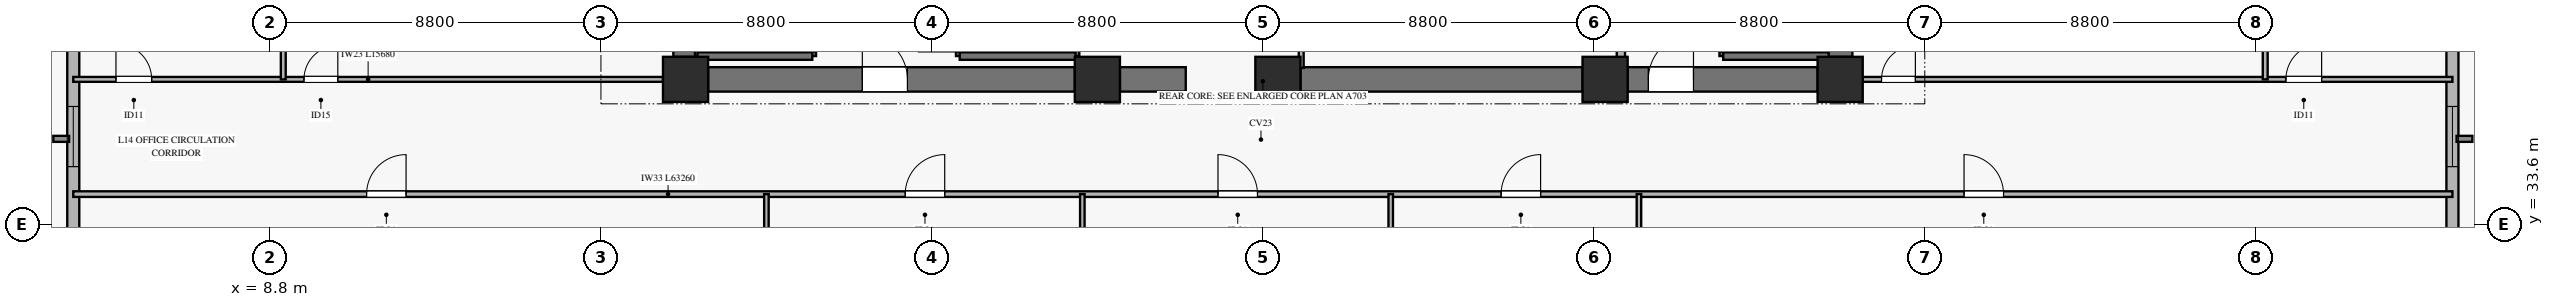
"""IFC4 building model, lengths in metres.
Left out: names, types, materials, properties, quantities, classifications, styles, units other than length and angle.
Written with IfcOpenShell. Run it as: python <this file> out.ifc"""

import sys

from ifc_helpers import new_model, si_unit, direction, frame, frame_2d, origin, origin_2d, place, context, subcontext, project, spatial, rectangle, extrude, source, transform, mapped, element, fill, save


model = new_model("IFC4")
c1 = context("Model", 3, precision=1e-05, world=origin(), true_north=direction((0.0, 1.0)))
c2 = subcontext(c1, "Body", "Model", "MODEL_VIEW")
j1 = project(units=[si_unit("LENGTHUNIT", "METRE"), si_unit("PLANEANGLEUNIT", "RADIAN")], contexts=[c1])
p1 = place(None, origin())
s1 = spatial("IfcSite", under=j1, at=p1, CompositionType="ELEMENT")
p2 = place(p1, origin())
s2 = spatial("IfcBuilding", under=s1, at=p2, CompositionType="ELEMENT")
p3 = place(p2, frame((0.0, 0.0, 57.2)))
s3 = spatial("IfcBuildingStorey", under=s2, at=p3, CompositionType="ELEMENT", Elevation=57.2)
m1 = source(origin(), c2, "Body", "SweptSolid", [
    extrude(rectangle(XDim=1.2, YDim=1.2, at=origin_2d()), origin(), (0.0, 0.0, 1.0), 3.68),
])
for number, where, z_axis, x_axis in (
    (1, (19.85, 37.45, 0.0), (0.0, 0.0, 1.0), (1.0, 0.0, 0.0)),
    (2, (30.8, 37.45, 0.0), (0.0, 0.0, 1.0), (1.0, 0.0, 0.0)),
    (3, (35.6, 37.45, 0.0), (0.0, 0.0, 1.0), (1.0, 0.0, 0.0)),
    (4, (44.3, 37.45, 0.0), (0.0, 0.0, 1.0), (1.0, 0.0, 0.0)),
    (5, (50.55, 37.45, 0.0), (0.0, 0.0, 1.0), (1.0, 0.0, 0.0)),
):
    element("IfcColumn", number, at=place(p3, frame(where, z_axis=z_axis, x_axis=x_axis)), inside=s3, PredefinedType="PILASTER", context=c2, shape_type="MappedRepresentation", body=[
        mapped(m1, transform((0.0, 0.0, 0.0), x_axis=(1.0, 0.0, 0.0), y_axis=(0.0, 1.0, 0.0), z_axis=(0.0, 0.0, 1.0), scale=1.0)),
    ])
p4 = place(p3, frame((20.45, 37.45, 0.0), z_axis=(0.0, 0.0, 1.0), x_axis=(1.0, 0.0, 0.0)))
e6 = element("IfcWall", 6, at=p4, inside=s3, PredefinedType="SHEAR", context=c2, shape_type="SweptSolid", body=[
    extrude(rectangle(XDim=9.75, YDim=0.65, at=frame_2d((4.875, 0.0))), origin(), (0.0, 0.0, 1.0), 3.68),
])
p5 = place(p4, frame((4.1, 0.0, 0.0)))
e7 = element("IfcOpeningElement", 7, at=p5, cuts=e6, PredefinedType="OPENING", context=c2, shape_type="SweptSolid", body=[
    extrude(rectangle(XDim=1.2, YDim=2.15, at=frame_2d((0.6, 1.075))), frame((0.0, 0.335, 0.0), z_axis=(0.0, -1.0, 0.0), x_axis=(1.0, 0.0, 0.0)), (0.0, 0.0, 1.0), 0.67),
])
p6 = place(p3, frame((31.4, 37.45, 0.0), z_axis=(0.0, 0.0, 1.0), x_axis=(1.0, 0.0, 0.0)))
e8 = element("IfcWall", 8, at=p6, inside=s3, PredefinedType="SHEAR", context=c2, shape_type="SweptSolid", body=[
    extrude(rectangle(XDim=1.75, YDim=0.65, at=frame_2d((0.875, 0.0))), origin(), (0.0, 0.0, 1.0), 3.68),
])
p7 = place(p3, frame((36.2, 37.45, 0.0), z_axis=(0.0, 0.0, 1.0), x_axis=(1.0, 0.0, 0.0)))
e9 = element("IfcWall", 9, at=p7, inside=s3, PredefinedType="SHEAR", context=c2, shape_type="SweptSolid", body=[
    extrude(rectangle(XDim=7.5, YDim=0.65, at=frame_2d((3.75, 0.0))), origin(), (0.0, 0.0, 1.0), 3.68),
])
p8 = place(p3, frame((44.9, 37.45, 0.0), z_axis=(0.0, 0.0, 1.0), x_axis=(1.0, 0.0, 0.0)))
e10 = element("IfcWall", 10, at=p8, inside=s3, PredefinedType="SHEAR", context=c2, shape_type="SweptSolid", body=[
    extrude(rectangle(XDim=5.05, YDim=0.65, at=frame_2d((2.525, 0.0))), origin(), (0.0, 0.0, 1.0), 3.68),
])
p9 = place(p8, frame((0.55, 0.0, 0.0)))
e11 = element("IfcOpeningElement", 11, at=p9, cuts=e10, PredefinedType="OPENING", context=c2, shape_type="SweptSolid", body=[
    extrude(rectangle(XDim=1.2, YDim=2.15, at=frame_2d((0.6, 1.075))), frame((0.0, 0.335, 0.0), z_axis=(0.0, -1.0, 0.0), x_axis=(1.0, 0.0, 0.0)), (0.0, 0.0, 1.0), 0.67),
])
for number, where, z_axis, x_axis in (
    (12, (19.85, 38.05, 0.0), (0.0, 0.0, 1.0), (0.0, 1.0, 0.0)),
    (13, (50.55, 38.05, 0.0), (0.0, 0.0, 1.0), (0.0, 1.0, 0.0)),
):
    element("IfcWall", number, at=place(p3, frame(where, z_axis=z_axis, x_axis=x_axis)), inside=s3, PredefinedType="SHEAR", context=c2, shape_type="SweptSolid", body=[
        extrude(rectangle(XDim=7.9, YDim=0.65, at=frame_2d((3.95, 0.0))), origin(), (0.0, 0.0, 1.0), 3.68),
    ])
p10 = place(p3, frame((3.57, 25.777, 0.0), z_axis=(0.0, 0.0, 1.0), x_axis=(0.0, 1.0, 0.0)))
e14 = element("IfcWall", 14, at=p10, inside=s3, PredefinedType="SOLIDWALL", context=c2, shape_type="SweptSolid", body=[
    extrude(rectangle(XDim=17.175, YDim=0.32, at=frame_2d((8.587, 0.0))), origin(), (0.0, 0.0, 1.0), 3.16),
])
p11 = place(p10, frame((9.353, 0.0, 0.45)))
e15 = element("IfcOpeningElement", 15, at=p11, cuts=e14, PredefinedType="OPENING", context=c2, shape_type="SweptSolid", body=[
    extrude(rectangle(XDim=1.6, YDim=2.0, at=frame_2d((0.8, 1.0))), frame((0.0, 0.17, 0.0), z_axis=(0.0, -1.0, 0.0), x_axis=(1.0, 0.0, 0.0)), (0.0, 0.0, 1.0), 0.34),
])
p12 = place(p3, frame((66.83, 25.777, 0.0), z_axis=(0.0, 0.0, 1.0), x_axis=(0.0, 1.0, 0.0)))
e16 = element("IfcWall", 16, at=p12, inside=s3, PredefinedType="SOLIDWALL", context=c2, shape_type="SweptSolid", body=[
    extrude(rectangle(XDim=17.175, YDim=0.32, at=frame_2d((8.587, 0.0))), origin(), (0.0, 0.0, 1.0), 3.16),
])
p13 = place(p12, frame((9.353, 0.0, 0.45)))
e17 = element("IfcOpeningElement", 17, at=p13, cuts=e16, PredefinedType="OPENING", context=c2, shape_type="SweptSolid", body=[
    extrude(rectangle(XDim=1.6, YDim=2.0, at=frame_2d((0.8, 1.0))), frame((0.0, 0.17, 0.0), z_axis=(0.0, -1.0, 0.0), x_axis=(1.0, 0.0, 0.0)), (0.0, 0.0, 1.0), 0.34),
])
p14 = place(p3, frame((20.17, 38.07, 0.0), z_axis=(0.0, 0.0, 1.0), x_axis=(0.0, 1.0, 0.0)))
e18 = element("IfcWall", 18, at=p14, inside=s3, PredefinedType="SOLIDWALL", context=c2, shape_type="SweptSolid", body=[
    extrude(rectangle(XDim=7.25, YDim=0.14, at=frame_2d((3.625, 0.0))), origin(), (0.0, 0.0, 1.0), 3.9),
])
p15 = place(p3, frame((23.22, 38.07, 0.0), z_axis=(0.0, 0.0, 1.0), x_axis=(0.0, 1.0, 0.0)))
e19 = element("IfcWall", 19, at=p15, inside=s3, PredefinedType="SOLIDWALL", context=c2, shape_type="SweptSolid", body=[
    extrude(rectangle(XDim=7.25, YDim=0.2, at=frame_2d((3.625, 0.0))), origin(), (0.0, 0.0, 1.0), 3.9),
])
p16 = place(p15, frame((0.11, 0.0, 0.0)))
e20 = element("IfcOpeningElement", 20, at=p16, cuts=e19, PredefinedType="OPENING", context=c2, shape_type="SweptSolid", body=[
    extrude(rectangle(XDim=1.1, YDim=2.15, at=frame_2d((0.55, 1.075))), frame((0.0, 0.11, 0.0), z_axis=(0.0, -1.0, 0.0), x_axis=(1.0, 0.0, 0.0)), (0.0, 0.0, 1.0), 0.22),
])
p17 = place(p3, frame((20.17, 38.07, 0.0), z_axis=(0.0, 0.0, 1.0), x_axis=(1.0, 0.0, 0.0)))
e21 = element("IfcWall", 21, at=p17, inside=s3, PredefinedType="SOLIDWALL", context=c2, shape_type="SweptSolid", body=[
    extrude(rectangle(XDim=3.05, YDim=0.2, at=frame_2d((1.525, 0.0))), origin(), (0.0, 0.0, 1.0), 3.9),
])
p18 = place(p3, frame((27.14, 38.07, 0.0), z_axis=(0.0, 0.0, 1.0), x_axis=(0.0, 1.0, 0.0)))
e22 = element("IfcWall", 22, at=p18, inside=s3, PredefinedType="SOLIDWALL", context=c2, shape_type="SweptSolid", body=[
    extrude(rectangle(XDim=7.25, YDim=0.2, at=frame_2d((3.625, 0.0))), origin(), (0.0, 0.0, 1.0), 3.9),
])
p19 = place(p18, frame((0.11, 0.0, 0.0)))
e23 = element("IfcOpeningElement", 23, at=p19, cuts=e22, PredefinedType="OPENING", context=c2, shape_type="SweptSolid", body=[
    extrude(rectangle(XDim=1.1, YDim=2.15, at=frame_2d((0.55, 1.075))), frame((0.0, 0.11, 0.0), z_axis=(0.0, -1.0, 0.0), x_axis=(1.0, 0.0, 0.0)), (0.0, 0.0, 1.0), 0.22),
])
p20 = place(p3, frame((30.22, 38.07, 0.0), z_axis=(0.0, 0.0, 1.0), x_axis=(0.0, 1.0, 0.0)))
e24 = element("IfcWall", 24, at=p20, inside=s3, PredefinedType="SOLIDWALL", context=c2, shape_type="SweptSolid", body=[
    extrude(rectangle(XDim=7.25, YDim=0.2, at=frame_2d((3.625, 0.0))), origin(), (0.0, 0.0, 1.0), 3.9),
])
p21 = place(p3, frame((27.14, 38.07, 0.0), z_axis=(0.0, 0.0, 1.0), x_axis=(1.0, 0.0, 0.0)))
e25 = element("IfcWall", 25, at=p21, inside=s3, PredefinedType="SOLIDWALL", context=c2, shape_type="SweptSolid", body=[
    extrude(rectangle(XDim=3.08, YDim=0.2, at=frame_2d((1.54, 0.0))), origin(), (0.0, 0.0, 1.0), 3.9),
])
p22 = place(p3, frame((47.44, 38.07, 0.0), z_axis=(0.0, 0.0, 1.0), x_axis=(0.0, 1.0, 0.0)))
e26 = element("IfcWall", 26, at=p22, inside=s3, PredefinedType="SOLIDWALL", context=c2, shape_type="SweptSolid", body=[
    extrude(rectangle(XDim=7.25, YDim=0.2, at=frame_2d((3.625, 0.0))), origin(), (0.0, 0.0, 1.0), 3.9),
])
p23 = place(p22, frame((0.11, 0.0, 0.0)))
e27 = element("IfcOpeningElement", 27, at=p23, cuts=e26, PredefinedType="OPENING", context=c2, shape_type="SweptSolid", body=[
    extrude(rectangle(XDim=1.1, YDim=2.15, at=frame_2d((0.55, 1.075))), frame((0.0, 0.11, 0.0), z_axis=(0.0, -1.0, 0.0), x_axis=(1.0, 0.0, 0.0)), (0.0, 0.0, 1.0), 0.22),
])
p24 = place(p3, frame((47.44, 38.07, 0.0), z_axis=(0.0, 0.0, 1.0), x_axis=(1.0, 0.0, 0.0)))
e28 = element("IfcWall", 28, at=p24, inside=s3, PredefinedType="SOLIDWALL", context=c2, shape_type="SweptSolid", body=[
    extrude(rectangle(XDim=2.805, YDim=0.2, at=frame_2d((1.403, 0.0))), origin(), (0.0, 0.0, 1.0), 3.9),
])
p25 = place(p3, frame((44.72, 37.755, 0.0), z_axis=(0.0, 0.0, 1.0), x_axis=(0.0, 1.0, 0.0)))
e29 = element("IfcWall", 29, at=p25, inside=s3, PredefinedType="SOLIDWALL", context=c2, shape_type="SweptSolid", body=[
    extrude(rectangle(XDim=7.465, YDim=0.22, at=frame_2d((3.732, 0.0))), origin(), (0.0, 0.0, 1.0), 3.68),
])
p26 = place(p3, frame((36.22, 37.755, 0.0), z_axis=(0.0, 0.0, 1.0), x_axis=(0.0, 1.0, 0.0)))
e30 = element("IfcWall", 30, at=p26, inside=s3, PredefinedType="PARTITIONING", context=c2, shape_type="SweptSolid", body=[
    extrude(rectangle(XDim=2.165, YDim=0.13, at=frame_2d((1.083, 0.0))), origin(), (0.0, 0.0, 1.0), 3.68),
])
p27 = place(p26, frame((0.855, 0.0, 0.0)))
e31 = element("IfcOpeningElement", 31, at=p27, cuts=e30, PredefinedType="OPENING", context=c2, shape_type="SweptSolid", body=[
    extrude(rectangle(XDim=0.9, YDim=2.1, at=frame_2d((0.45, 1.05))), frame((0.0, 0.075, 0.0), z_axis=(0.0, -1.0, 0.0), x_axis=(1.0, 0.0, 0.0)), (0.0, 0.0, 1.0), 0.15),
])
p28 = place(p3, frame((3.57, 34.4, 0.0), z_axis=(0.0, 0.0, 1.0), x_axis=(1.0, 0.0, 0.0)))
e32 = element("IfcWall", 32, at=p28, inside=s3, PredefinedType="PARTITIONING", context=c2, shape_type="SweptSolid", body=[
    extrude(rectangle(XDim=63.26, YDim=0.15, at=frame_2d((31.63, 0.0))), origin(), (0.0, 0.0, 1.0), 2.765),
])
p29 = place(p28, frame((7.799, 0.0, 0.0)))
e33 = element("IfcOpeningElement", 33, at=p29, cuts=e32, PredefinedType="OPENING", context=c2, shape_type="SweptSolid", body=[
    extrude(rectangle(XDim=1.05, YDim=2.15, at=frame_2d((0.525, 1.075))), frame((0.0, 0.085, 0.0), z_axis=(0.0, -1.0, 0.0), x_axis=(1.0, 0.0, 0.0)), (0.0, 0.0, 1.0), 0.17),
])
p30 = place(p28, frame((22.121, 0.0, 0.0)))
e34 = element("IfcOpeningElement", 34, at=p30, cuts=e32, PredefinedType="OPENING", context=c2, shape_type="SweptSolid", body=[
    extrude(rectangle(XDim=1.05, YDim=2.15, at=frame_2d((0.525, 1.075))), frame((0.0, 0.085, 0.0), z_axis=(0.0, -1.0, 0.0), x_axis=(1.0, 0.0, 0.0)), (0.0, 0.0, 1.0), 0.17),
])
p31 = place(p28, frame((30.437, 0.0, 0.0)))
e35 = element("IfcOpeningElement", 35, at=p31, cuts=e32, PredefinedType="OPENING", context=c2, shape_type="SweptSolid", body=[
    extrude(rectangle(XDim=1.05, YDim=2.15, at=frame_2d((0.525, 1.075))), frame((0.0, 0.085, 0.0), z_axis=(0.0, -1.0, 0.0), x_axis=(1.0, 0.0, 0.0)), (0.0, 0.0, 1.0), 0.17),
])
p32 = place(p28, frame((37.965, 0.0, 0.0)))
e36 = element("IfcOpeningElement", 36, at=p32, cuts=e32, PredefinedType="OPENING", context=c2, shape_type="SweptSolid", body=[
    extrude(rectangle(XDim=1.05, YDim=2.15, at=frame_2d((0.525, 1.075))), frame((0.0, 0.085, 0.0), z_axis=(0.0, -1.0, 0.0), x_axis=(1.0, 0.0, 0.0)), (0.0, 0.0, 1.0), 0.17),
])
p33 = place(p28, frame((50.274, 0.0, 0.0)))
e37 = element("IfcOpeningElement", 37, at=p33, cuts=e32, PredefinedType="OPENING", context=c2, shape_type="SweptSolid", body=[
    extrude(rectangle(XDim=1.05, YDim=2.15, at=frame_2d((0.525, 1.075))), frame((0.0, 0.085, 0.0), z_axis=(0.0, -1.0, 0.0), x_axis=(1.0, 0.0, 0.0)), (0.0, 0.0, 1.0), 0.17),
])
p34 = place(p3, frame((22.0, 4.354, 0.0), z_axis=(0.0, 0.0, 1.0), x_axis=(0.0, 1.0, 0.0)))
e38 = element("IfcWall", 38, at=p34, inside=s3, PredefinedType="PARTITIONING", context=c2, shape_type="SweptSolid", body=[
    extrude(rectangle(XDim=30.046, YDim=0.12, at=frame_2d((15.023, 0.0))), origin(), (0.0, 0.0, 1.0), 3.165),
])
p35 = place(p3, frame((30.4, 4.354, 0.0), z_axis=(0.0, 0.0, 1.0), x_axis=(0.0, 1.0, 0.0)))
e39 = element("IfcWall", 39, at=p35, inside=s3, PredefinedType="PARTITIONING", context=c2, shape_type="SweptSolid", body=[
    extrude(rectangle(XDim=30.046, YDim=0.12, at=frame_2d((15.023, 0.0))), origin(), (0.0, 0.0, 1.0), 3.215),
])
for number, where, z_axis, x_axis in (
    (40, (38.6, 4.354, 0.0), (0.0, 0.0, 1.0), (0.0, 1.0, 0.0)),
    (41, (45.2, 4.354, 0.0), (0.0, 0.0, 1.0), (0.0, 1.0, 0.0)),
):
    element("IfcWall", number, at=place(p3, frame(where, z_axis=z_axis, x_axis=x_axis)), inside=s3, PredefinedType="PARTITIONING", context=c2, shape_type="SweptSolid", body=[
        extrude(rectangle(XDim=30.046, YDim=0.12, at=frame_2d((15.023, 0.0))), origin(), (0.0, 0.0, 1.0), 3.165),
    ])
p36 = place(p3, frame((3.57, 37.45, 0.0), z_axis=(0.0, 0.0, 1.0), x_axis=(1.0, 0.0, 0.0)))
e42 = element("IfcWall", 42, at=p36, inside=s3, PredefinedType="PARTITIONING", context=c2, shape_type="SweptSolid", body=[
    extrude(rectangle(XDim=15.68, YDim=0.13, at=frame_2d((7.84, 0.0))), origin(), (0.0, 0.0, 1.0), 3.165),
])
p37 = place(p36, frame((1.135, 0.0, 0.0)))
e43 = element("IfcOpeningElement", 43, at=p37, cuts=e42, PredefinedType="OPENING", context=c2, shape_type="SweptSolid", body=[
    extrude(rectangle(XDim=0.95, YDim=2.1, at=frame_2d((0.475, 1.05))), frame((0.0, 0.075, 0.0), z_axis=(0.0, -1.0, 0.0), x_axis=(1.0, 0.0, 0.0)), (0.0, 0.0, 1.0), 0.15),
])
p38 = place(p36, frame((6.134, 0.0, 0.0)))
e44 = element("IfcOpeningElement", 44, at=p38, cuts=e42, PredefinedType="OPENING", context=c2, shape_type="SweptSolid", body=[
    extrude(rectangle(XDim=0.9, YDim=2.1, at=frame_2d((0.45, 1.05))), frame((0.0, 0.075, 0.0), z_axis=(0.0, -1.0, 0.0), x_axis=(1.0, 0.0, 0.0)), (0.0, 0.0, 1.0), 0.15),
])
p39 = place(p3, frame((9.154, 37.45, 0.0), z_axis=(0.0, 0.0, 1.0), x_axis=(0.0, 1.0, 0.0)))
e45 = element("IfcWall", 45, at=p39, inside=s3, PredefinedType="PARTITIONING", context=c2, shape_type="SweptSolid", body=[
    extrude(rectangle(XDim=8.8, YDim=0.13, at=frame_2d((4.4, 0.0))), origin(), (0.0, 0.0, 1.0), 3.68),
])
p40 = place(p3, frame((51.15, 37.45, 0.0), z_axis=(0.0, 0.0, 1.0), x_axis=(1.0, 0.0, 0.0)))
e46 = element("IfcWall", 46, at=p40, inside=s3, PredefinedType="PARTITIONING", context=c2, shape_type="SweptSolid", body=[
    extrude(rectangle(XDim=15.68, YDim=0.13, at=frame_2d((7.84, 0.0))), origin(), (0.0, 0.0, 1.0), 3.165),
])
p41 = place(p40, frame((0.5, 0.0, 0.0)))
e47 = element("IfcOpeningElement", 47, at=p41, cuts=e46, PredefinedType="OPENING", context=c2, shape_type="SweptSolid", body=[
    extrude(rectangle(XDim=0.9, YDim=2.1, at=frame_2d((0.45, 1.05))), frame((0.0, 0.075, 0.0), z_axis=(0.0, -1.0, 0.0), x_axis=(1.0, 0.0, 0.0)), (0.0, 0.0, 1.0), 0.15),
])
p42 = place(p40, frame((11.252, 0.0, 0.0)))
e48 = element("IfcOpeningElement", 48, at=p42, cuts=e46, PredefinedType="OPENING", context=c2, shape_type="SweptSolid", body=[
    extrude(rectangle(XDim=0.95, YDim=2.1, at=frame_2d((0.475, 1.05))), frame((0.0, 0.075, 0.0), z_axis=(0.0, -1.0, 0.0), x_axis=(1.0, 0.0, 0.0)), (0.0, 0.0, 1.0), 0.15),
])
p43 = place(p3, frame((61.852, 37.45, 0.0), z_axis=(0.0, 0.0, 1.0), x_axis=(0.0, 1.0, 0.0)))
e49 = element("IfcWall", 49, at=p43, inside=s3, PredefinedType="PARTITIONING", context=c2, shape_type="SweptSolid", body=[
    extrude(rectangle(XDim=8.8, YDim=0.13, at=frame_2d((4.4, 0.0))), origin(), (0.0, 0.0, 1.0), 3.68),
])
m2 = source(origin(), c2, "Body", "SweptSolid", [
    extrude(rectangle(XDim=1.6, YDim=2.0, at=frame_2d((0.8, 1.0))), frame((0.0, 0.03, 0.0), z_axis=(0.0, -1.0, 0.0), x_axis=(1.0, 0.0, 0.0)), (0.0, 0.0, 1.0), 0.06),
])
p44 = place(p11, origin())
e50 = element("IfcWindow", 50, at=p44, inside=s3, PartitioningType="SINGLE_PANEL", PredefinedType="WINDOW", context=c2, shape_type="MappedRepresentation", body=[
    mapped(m2, transform((0.0, 0.0, 0.0), x_axis=(1.0, 0.0, 0.0), y_axis=(0.0, 1.0, 0.0), z_axis=(0.0, 0.0, 1.0), scale=1.0)),
])
fill(e15, e50)
p45 = place(p13, origin())
e51 = element("IfcWindow", 51, at=p45, inside=s3, PartitioningType="SINGLE_PANEL", PredefinedType="WINDOW", context=c2, shape_type="MappedRepresentation", body=[
    mapped(m2, transform((0.0, 0.0, 0.0), x_axis=(1.0, 0.0, 0.0), y_axis=(0.0, 1.0, 0.0), z_axis=(0.0, 0.0, 1.0), scale=1.0)),
])
fill(e17, e51)
m3 = source(origin(), c2, "Body", "SweptSolid", [
    extrude(rectangle(XDim=1.2, YDim=2.15, at=frame_2d((0.6, 1.075))), frame((0.0, 0.025, 0.0), z_axis=(0.0, -1.0, 0.0), x_axis=(1.0, 0.0, 0.0)), (0.0, 0.0, 1.0), 0.05),
])
p46 = place(p5, origin())
e52 = element("IfcDoor", 52, at=p46, inside=s3, OperationType="SINGLE_SWING_LEFT", PredefinedType="DOOR", context=c2, shape_type="MappedRepresentation", body=[
    mapped(m3, transform((0.0, 0.0, 0.0), x_axis=(1.0, 0.0, 0.0), y_axis=(0.0, 1.0, 0.0), z_axis=(0.0, 0.0, 1.0), scale=1.0)),
])
fill(e7, e52)
p47 = place(p9, origin())
e53 = element("IfcDoor", 53, at=p47, inside=s3, OperationType="SINGLE_SWING_RIGHT", PredefinedType="DOOR", context=c2, shape_type="MappedRepresentation", body=[
    mapped(m3, transform((0.0, 0.0, 0.0), x_axis=(1.0, 0.0, 0.0), y_axis=(0.0, 1.0, 0.0), z_axis=(0.0, 0.0, 1.0), scale=1.0)),
])
fill(e11, e53)
m4 = source(origin(), c2, "Body", "SweptSolid", [
    extrude(rectangle(XDim=1.05, YDim=2.15, at=frame_2d((0.525, 1.075))), frame((0.0, 0.025, 0.0), z_axis=(0.0, -1.0, 0.0), x_axis=(1.0, 0.0, 0.0)), (0.0, 0.0, 1.0), 0.05),
])
p48 = place(p29, origin())
e54 = element("IfcDoor", 54, at=p48, inside=s3, OperationType="SINGLE_SWING_RIGHT", PredefinedType="DOOR", context=c2, shape_type="MappedRepresentation", body=[
    mapped(m4, transform((0.0, 0.0, 0.0), x_axis=(1.0, 0.0, 0.0), y_axis=(0.0, 1.0, 0.0), z_axis=(0.0, 0.0, 1.0), scale=1.0)),
])
fill(e33, e54)
p49 = place(p30, origin())
e55 = element("IfcDoor", 55, at=p49, inside=s3, OperationType="SINGLE_SWING_RIGHT", PredefinedType="DOOR", context=c2, shape_type="MappedRepresentation", body=[
    mapped(m4, transform((0.0, 0.0, 0.0), x_axis=(1.0, 0.0, 0.0), y_axis=(0.0, 1.0, 0.0), z_axis=(0.0, 0.0, 1.0), scale=1.0)),
])
fill(e34, e55)
p50 = place(p31, origin())
e56 = element("IfcDoor", 56, at=p50, inside=s3, OperationType="SINGLE_SWING_LEFT", PredefinedType="DOOR", context=c2, shape_type="MappedRepresentation", body=[
    mapped(m4, transform((0.0, 0.0, 0.0), x_axis=(1.0, 0.0, 0.0), y_axis=(0.0, 1.0, 0.0), z_axis=(0.0, 0.0, 1.0), scale=1.0)),
])
fill(e35, e56)
p51 = place(p32, origin())
e57 = element("IfcDoor", 57, at=p51, inside=s3, OperationType="SINGLE_SWING_RIGHT", PredefinedType="DOOR", context=c2, shape_type="MappedRepresentation", body=[
    mapped(m4, transform((0.0, 0.0, 0.0), x_axis=(1.0, 0.0, 0.0), y_axis=(0.0, 1.0, 0.0), z_axis=(0.0, 0.0, 1.0), scale=1.0)),
])
fill(e36, e57)
p52 = place(p33, origin())
e58 = element("IfcDoor", 58, at=p52, inside=s3, OperationType="SINGLE_SWING_LEFT", PredefinedType="DOOR", context=c2, shape_type="MappedRepresentation", body=[
    mapped(m4, transform((0.0, 0.0, 0.0), x_axis=(1.0, 0.0, 0.0), y_axis=(0.0, 1.0, 0.0), z_axis=(0.0, 0.0, 1.0), scale=1.0)),
])
fill(e37, e58)
m5 = source(origin(), c2, "Body", "SweptSolid", [
    extrude(rectangle(XDim=0.95, YDim=2.1, at=frame_2d((0.475, 1.05))), frame((0.0, 0.025, 0.0), z_axis=(0.0, -1.0, 0.0), x_axis=(1.0, 0.0, 0.0)), (0.0, 0.0, 1.0), 0.05),
])
p53 = place(p37, origin())
e59 = element("IfcDoor", 59, at=p53, inside=s3, OperationType="SINGLE_SWING_LEFT", PredefinedType="DOOR", context=c2, shape_type="MappedRepresentation", body=[
    mapped(m5, transform((0.0, 0.0, 0.0), x_axis=(1.0, 0.0, 0.0), y_axis=(0.0, 1.0, 0.0), z_axis=(0.0, 0.0, 1.0), scale=1.0)),
])
fill(e43, e59)
m6 = source(origin(), c2, "Body", "SweptSolid", [
    extrude(rectangle(XDim=0.9, YDim=2.1, at=frame_2d((0.45, 1.05))), frame((0.0, 0.025, 0.0), z_axis=(0.0, -1.0, 0.0), x_axis=(1.0, 0.0, 0.0)), (0.0, 0.0, 1.0), 0.05),
])
p54 = place(p38, origin())
e60 = element("IfcDoor", 60, at=p54, inside=s3, OperationType="SINGLE_SWING_RIGHT", PredefinedType="DOOR", context=c2, shape_type="MappedRepresentation", body=[
    mapped(m6, transform((0.0, 0.0, 0.0), x_axis=(1.0, 0.0, 0.0), y_axis=(0.0, 1.0, 0.0), z_axis=(0.0, 0.0, 1.0), scale=1.0)),
])
fill(e44, e60)
p55 = place(p41, origin())
e61 = element("IfcDoor", 61, at=p55, inside=s3, OperationType="SINGLE_SWING_RIGHT", PredefinedType="DOOR", context=c2, shape_type="MappedRepresentation", body=[
    mapped(m6, transform((0.0, 0.0, 0.0), x_axis=(1.0, 0.0, 0.0), y_axis=(0.0, 1.0, 0.0), z_axis=(0.0, 0.0, 1.0), scale=1.0)),
])
fill(e47, e61)
p56 = place(p42, origin())
e62 = element("IfcDoor", 62, at=p56, inside=s3, OperationType="SINGLE_SWING_RIGHT", PredefinedType="DOOR", context=c2, shape_type="MappedRepresentation", body=[
    mapped(m5, transform((0.0, 0.0, 0.0), x_axis=(1.0, 0.0, 0.0), y_axis=(0.0, 1.0, 0.0), z_axis=(0.0, 0.0, 1.0), scale=1.0)),
])
fill(e48, e62)
save(model, sys.argv[1])
